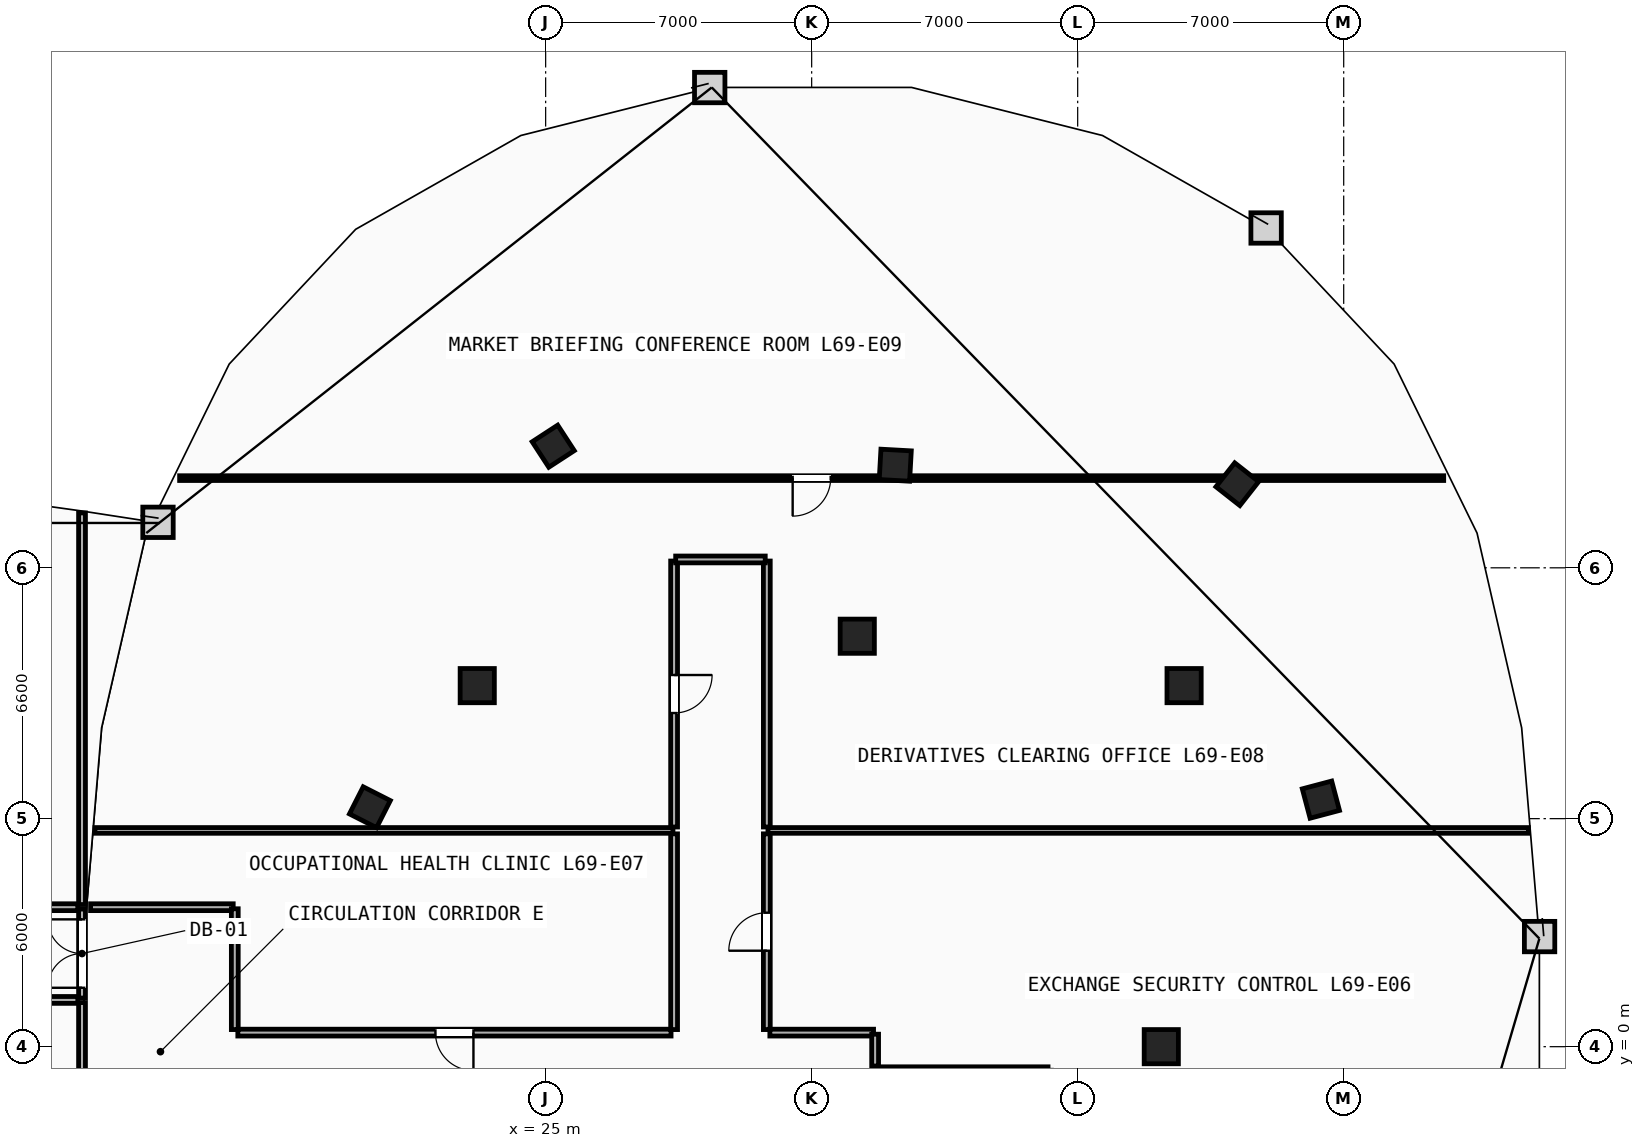
"""IFC4 building model, lengths in metres.
Left out: names, types, materials, properties, quantities, classifications, styles, units other than length and angle.
Written with IfcOpenShell. Run it as: python <this file> out.ifc"""

import sys

from ifc_helpers import new_model, si_unit, direction, frame, frame_2d, origin, origin_2d, place, context, subcontext, project, spatial, rectangle, extrude, element, fill, save


model = new_model("IFC4")
c1 = context("Model", 3, precision=1e-05, world=origin(), true_north=direction((0.0, 1.0)))
c2 = subcontext(c1, "Body", "Model", "MODEL_VIEW")
j1 = project(units=[si_unit("LENGTHUNIT", "METRE"), si_unit("PLANEANGLEUNIT", "RADIAN")], contexts=[c1])
p1 = place(None, origin())
s1 = spatial("IfcSite", under=j1, at=p1, CompositionType="ELEMENT")
p2 = place(p1, origin())
s2 = spatial("IfcBuilding", under=s1, at=p2, CompositionType="ELEMENT")
p3 = place(p2, frame((0.0, 0.0, 261.2)))
s3 = spatial("IfcBuildingStorey", under=s2, at=p3, CompositionType="ELEMENT", Elevation=261.2)
for number, where, z_axis, x_axis in (
    (1, (41.2, 0.0, 0.0), (0.0, 0.0, 1.0), (1.0, 0.0, 0.0)),
    (2, (41.8, 9.5, 0.0), (0.0, 0.0, 1.0), (1.0, 0.0, 0.0)),
    (3, (33.2, 10.8, 0.0), (0.0, 0.0, 1.0), (1.0, 0.0, 0.0)),
    (4, (23.2, 9.5, 0.0), (0.0, 0.0, 1.0), (1.0, 0.0, 0.0)),
):
    element("IfcColumn", number, at=place(p3, frame(where, z_axis=z_axis, x_axis=x_axis)), inside=s3, PredefinedType="COLUMN", context=c2, shape_type="SweptSolid", body=[
        extrude(rectangle(XDim=0.9, YDim=0.9, at=origin_2d()), origin(), (0.0, 0.0, 1.0), 3.6),
    ])
for number, where, z_axis, x_axis in (
    (5, (45.4, 6.5, 0.0), (0.0, 0.0, 1.0), (-0.256, 0.967, 0.0)),
    (6, (43.2, 14.8, 0.0), (0.0, 0.0, 1.0), (-0.786, 0.618, 0.0)),
    (7, (34.2, 15.3, 0.0), (0.0, 0.0, 1.0), (-0.998, 0.055, 0.0)),
    (8, (25.2, 15.8, 0.0), (0.0, 0.0, 1.0), (-0.838, -0.546, 0.0)),
    (9, (20.375, 6.3, 0.0), (0.0, 0.0, 1.0), (-0.453, -0.892, 0.0)),
):
    element("IfcColumn", number, at=place(p3, frame(where, z_axis=z_axis, x_axis=x_axis)), inside=s3, PredefinedType="COLUMN", context=c2, shape_type="SweptSolid", body=[
        extrude(rectangle(XDim=0.8, YDim=0.8, at=origin_2d()), origin(), (0.0, 0.0, 1.0), 3.6),
    ])
p4 = place(p3, frame((33.74, -0.6, 0.0), z_axis=(0.0, 0.0, 1.0), x_axis=(1.0, 0.0, 0.0)))
e10 = element("IfcWall", 10, at=p4, inside=s3, PredefinedType="PARTITIONING", context=c2, shape_type="SweptSolid", body=[
    extrude(rectangle(XDim=4.48, YDim=0.14, at=frame_2d((2.24, 0.0))), origin(), (0.0, 0.0, 1.0), 3.34),
])
p5 = place(p3, frame((13.14, 5.69, 0.0), z_axis=(0.0, 0.0, 1.0), x_axis=(1.0, 0.0, 0.0)))
e11 = element("IfcWall", 11, at=p5, inside=s3, PredefinedType="PARTITIONING", context=c2, shape_type="SweptSolid", body=[
    extrude(rectangle(XDim=15.21, YDim=0.15, at=frame_2d((7.605, 0.0))), origin(), (0.0, 0.0, 1.0), 3.34),
])
p6 = place(p3, frame((30.85, 5.69, 0.0), z_axis=(0.0, 0.0, 1.0), x_axis=(1.0, 0.0, 0.0)))
e12 = element("IfcWall", 12, at=p6, inside=s3, PredefinedType="PARTITIONING", context=c2, shape_type="SweptSolid", body=[
    extrude(rectangle(XDim=20.01, YDim=0.15, at=frame_2d((10.005, 0.0))), origin(), (0.0, 0.0, 1.0), 3.34),
])
p7 = place(p3, frame((30.82, 0.45, 0.0), z_axis=(0.0, 0.0, 1.0), x_axis=(0.0, 1.0, 0.0)))
e13 = element("IfcWall", 13, at=p7, inside=s3, PredefinedType="PARTITIONING", context=c2, shape_type="SweptSolid", body=[
    extrude(rectangle(XDim=5.15, YDim=0.18, at=frame_2d((2.575, 0.0))), origin(), (0.0, 0.0, 1.0), 3.34),
])
p8 = place(p7, frame((2.075, 0.0, 0.0)))
e14 = element("IfcOpeningElement", 14, at=p8, cuts=e13, PredefinedType="OPENING", context=c2, shape_type="SweptSolid", body=[
    extrude(rectangle(XDim=1.0, YDim=2.15, at=frame_2d((0.5, 1.075))), frame((0.0, 0.1, 0.0), z_axis=(0.0, -1.0, 0.0), x_axis=(1.0, 0.0, 0.0)), (0.0, 0.0, 1.0), 0.2),
])
p9 = place(p3, frame((33.628, 0.37, 0.0), z_axis=(0.0, 0.0, 1.0), x_axis=(-1.0, 0.0, 0.0)))
e15 = element("IfcWall", 15, at=p9, inside=s3, PredefinedType="PARTITIONING", context=c2, shape_type="SweptSolid", body=[
    extrude(rectangle(XDim=2.729, YDim=0.18, at=frame_2d((1.364, 0.0))), origin(), (0.0, 0.0, 1.0), 3.34),
])
p10 = place(p3, frame((33.67, -0.509, 0.0), z_axis=(0.0, 0.0, 1.0), x_axis=(0.0, 1.0, 0.0)))
e16 = element("IfcWall", 16, at=p10, inside=s3, PredefinedType="PARTITIONING", context=c2, shape_type="SweptSolid", body=[
    extrude(rectangle(XDim=0.837, YDim=0.18, at=frame_2d((0.418, 0.0))), origin(), (0.0, 0.0, 1.0), 3.34),
])
p11 = place(p3, frame((28.3, 0.37, 0.0), z_axis=(0.0, 0.0, 1.0), x_axis=(-1.0, 0.0, 0.0)))
e17 = element("IfcWall", 17, at=p11, inside=s3, PredefinedType="PARTITIONING", context=c2, shape_type="SweptSolid", body=[
    extrude(rectangle(XDim=11.4, YDim=0.18, at=frame_2d((5.7, 0.0))), origin(), (0.0, 0.0, 1.0), 3.34),
])
p12 = place(p11, frame((5.2, 0.0, 0.0)))
e18 = element("IfcOpeningElement", 18, at=p12, cuts=e17, PredefinedType="OPENING", context=c2, shape_type="SweptSolid", body=[
    extrude(rectangle(XDim=1.0, YDim=2.15, at=frame_2d((0.5, 1.075))), frame((0.0, 0.1, 0.0), z_axis=(0.0, -1.0, 0.0), x_axis=(1.0, 0.0, 0.0)), (0.0, 0.0, 1.0), 0.2),
])
p13 = place(p3, frame((28.38, 5.6, 0.0), z_axis=(0.0, 0.0, 1.0), x_axis=(0.0, -1.0, 0.0)))
e19 = element("IfcWall", 19, at=p13, inside=s3, PredefinedType="PARTITIONING", context=c2, shape_type="SweptSolid", body=[
    extrude(rectangle(XDim=5.15, YDim=0.18, at=frame_2d((2.575, 0.0))), origin(), (0.0, 0.0, 1.0), 3.34),
])
p14 = place(p3, frame((16.779, 3.67, 0.0), z_axis=(0.0, 0.0, 1.0), x_axis=(-1.0, 0.0, 0.0)))
e20 = element("IfcWall", 20, at=p14, inside=s3, PredefinedType="PARTITIONING", context=c2, shape_type="SweptSolid", body=[
    extrude(rectangle(XDim=3.753, YDim=0.18, at=frame_2d((1.876, 0.0))), origin(), (0.0, 0.0, 1.0), 3.34),
])
p15 = place(p3, frame((16.82, 0.45, 0.0), z_axis=(0.0, 0.0, 1.0), x_axis=(0.0, 1.0, 0.0)))
e21 = element("IfcWall", 21, at=p15, inside=s3, PredefinedType="PARTITIONING", context=c2, shape_type="SweptSolid", body=[
    extrude(rectangle(XDim=3.178, YDim=0.18, at=frame_2d((1.589, 0.0))), origin(), (0.0, 0.0, 1.0), 3.34),
])
p16 = place(p3, frame((28.38, 12.779, 0.0), z_axis=(0.0, 0.0, 1.0), x_axis=(0.0, -1.0, 0.0)))
e22 = element("IfcWall", 22, at=p16, inside=s3, PredefinedType="PARTITIONING", context=c2, shape_type="SweptSolid", body=[
    extrude(rectangle(XDim=6.999, YDim=0.18, at=frame_2d((3.499, 0.0))), origin(), (0.0, 0.0, 1.0), 3.34),
])
p17 = place(p16, frame((2.999, 0.0, 0.0)))
e23 = element("IfcOpeningElement", 23, at=p17, cuts=e22, PredefinedType="OPENING", context=c2, shape_type="SweptSolid", body=[
    extrude(rectangle(XDim=1.0, YDim=2.15, at=frame_2d((0.5, 1.075))), frame((0.0, 0.1, 0.0), z_axis=(0.0, -1.0, 0.0), x_axis=(1.0, 0.0, 0.0)), (0.0, 0.0, 1.0), 0.2),
])
p18 = place(p3, frame((30.82, 5.78, 0.0), z_axis=(0.0, 0.0, 1.0), x_axis=(0.0, 1.0, 0.0)))
e24 = element("IfcWall", 24, at=p18, inside=s3, PredefinedType="PARTITIONING", context=c2, shape_type="SweptSolid", body=[
    extrude(rectangle(XDim=6.999, YDim=0.18, at=frame_2d((3.499, 0.0))), origin(), (0.0, 0.0, 1.0), 3.34),
])
p19 = place(p3, frame((30.779, 12.82, 0.0), z_axis=(0.0, 0.0, 1.0), x_axis=(-1.0, 0.0, 0.0)))
e25 = element("IfcWall", 25, at=p19, inside=s3, PredefinedType="PARTITIONING", context=c2, shape_type="SweptSolid", body=[
    extrude(rectangle(XDim=2.357, YDim=0.18, at=frame_2d((1.179, 0.0))), origin(), (0.0, 0.0, 1.0), 3.34),
])
p20 = place(p3, frame((48.632, 14.96, 0.0), z_axis=(0.0, 0.0, 1.0), x_axis=(-1.0, 0.0, 0.0)))
e26 = element("IfcWall", 26, at=p20, inside=s3, PredefinedType="PARTITIONING", context=c2, shape_type="SweptSolid", body=[
    extrude(rectangle(XDim=33.263, YDim=0.125, at=frame_2d((16.632, 0.0))), origin(), (0.0, 0.0, 1.0), 2.724),
])
p21 = place(p20, frame((16.132, 0.0, 0.0)))
e27 = element("IfcOpeningElement", 27, at=p21, cuts=e26, PredefinedType="OPENING", context=c2, shape_type="SweptSolid", body=[
    extrude(rectangle(XDim=1.0, YDim=2.15, at=frame_2d((0.5, 1.075))), frame((0.0, 0.073, 0.0), z_axis=(0.0, -1.0, 0.0), x_axis=(1.0, 0.0, 0.0)), (0.0, 0.0, 1.0), 0.145),
])
p22 = place(p3, frame((-2.105, 1.23, 0.0), z_axis=(0.0, 0.0, 1.0), x_axis=(1.0, 0.0, 0.0)))
e28 = element("IfcWall", 28, at=p22, inside=s3, PredefinedType="PARTITIONING", context=c2, shape_type="SweptSolid", body=[
    extrude(rectangle(XDim=14.793, YDim=0.18, at=frame_2d((7.397, 0.0))), origin(), (0.0, 0.0, 1.0), 3.34),
])
p23 = place(p22, frame((6.597, 0.0, 0.0)))
e29 = element("IfcOpeningElement", 29, at=p23, cuts=e28, PredefinedType="OPENING", context=c2, shape_type="SweptSolid", body=[
    extrude(rectangle(XDim=1.6, YDim=2.2, at=frame_2d((0.8, 1.1))), frame((0.0, 0.1, 0.0), z_axis=(0.0, -1.0, 0.0), x_axis=(1.0, 0.0, 0.0)), (0.0, 0.0, 1.0), 0.2),
])
p24 = place(p3, frame((12.688, 3.67, 0.0), z_axis=(0.0, 0.0, 1.0), x_axis=(-1.0, 0.0, 0.0)))
e30 = element("IfcWall", 30, at=p24, inside=s3, PredefinedType="PARTITIONING", context=c2, shape_type="SweptSolid", body=[
    extrude(rectangle(XDim=14.793, YDim=0.18, at=frame_2d((7.397, 0.0))), origin(), (0.0, 0.0, 1.0), 3.34),
])
p25 = place(p24, frame((6.597, 0.0, 0.0)))
e31 = element("IfcOpeningElement", 31, at=p25, cuts=e30, PredefinedType="OPENING", context=c2, shape_type="SweptSolid", body=[
    extrude(rectangle(XDim=1.6, YDim=2.2, at=frame_2d((0.8, 1.1))), frame((0.0, 0.1, 0.0), z_axis=(0.0, -1.0, 0.0), x_axis=(1.0, 0.0, 0.0)), (0.0, 0.0, 1.0), 0.2),
])
p26 = place(p3, frame((12.8, -14.044, 0.0), z_axis=(0.0, 0.0, 1.0), x_axis=(0.0, 1.0, 0.0)))
e32 = element("IfcWall", 32, at=p26, inside=s3, PredefinedType="PARTITIONING", context=c2, shape_type="SweptSolid", body=[
    extrude(rectangle(XDim=15.204, YDim=0.18, at=frame_2d((7.602, 0.0))), origin(), (0.0, 0.0, 1.0), 3.34),
])
p27 = place(p3, frame((12.8, 3.74, 0.0), z_axis=(0.0, 0.0, 1.0), x_axis=(0.0, 1.0, 0.0)))
e33 = element("IfcWall", 33, at=p27, inside=s3, PredefinedType="PARTITIONING", context=c2, shape_type="SweptSolid", body=[
    extrude(rectangle(XDim=10.304, YDim=0.18, at=frame_2d((5.152, 0.0))), origin(), (0.0, 0.0, 1.0), 3.34),
])
p28 = place(p3, frame((12.8, 1.28, 0.0), z_axis=(0.0, 0.0, 1.0), x_axis=(0.0, 1.0, 0.0)))
e34 = element("IfcWall", 34, at=p28, inside=s3, PredefinedType="PARTITIONING", context=c2, shape_type="SweptSolid", body=[
    extrude(rectangle(XDim=2.34, YDim=0.18, at=frame_2d((1.17, 0.0))), origin(), (0.0, 0.0, 1.0), 3.34),
])
p29 = place(p28, frame((0.27, 0.0, 0.0)))
e35 = element("IfcOpeningElement", 35, at=p29, cuts=e34, PredefinedType="OPENING", context=c2, shape_type="SweptSolid", body=[
    extrude(rectangle(XDim=1.8, YDim=2.25, at=frame_2d((0.9, 1.125))), frame((0.0, 0.1, 0.0), z_axis=(0.0, -1.0, 0.0), x_axis=(1.0, 0.0, 0.0)), (0.0, 0.0, 1.0), 0.2),
])
p30 = place(p21, origin())
e36 = element("IfcDoor", 36, at=p30, inside=s3, OperationType="SINGLE_SWING_RIGHT", PredefinedType="DOOR", context=c2, shape_type="SweptSolid", body=[
    extrude(rectangle(XDim=1.0, YDim=2.15, at=frame_2d((0.5, 1.075))), frame((0.0, 0.025, 0.0), z_axis=(0.0, -1.0, 0.0), x_axis=(1.0, 0.0, 0.0)), (0.0, 0.0, 1.0), 0.05),
])
fill(e27, e36)
p31 = place(p12, origin())
e37 = element("IfcDoor", 37, at=p31, inside=s3, OperationType="SINGLE_SWING_LEFT", PredefinedType="DOOR", context=c2, shape_type="SweptSolid", body=[
    extrude(rectangle(XDim=1.0, YDim=2.15, at=frame_2d((0.5, 1.075))), frame((0.0, 0.025, 0.0), z_axis=(0.0, -1.0, 0.0), x_axis=(1.0, 0.0, 0.0)), (0.0, 0.0, 1.0), 0.05),
])
fill(e18, e37)
p32 = place(p17, origin())
e38 = element("IfcDoor", 38, at=p32, inside=s3, OperationType="SINGLE_SWING_LEFT", PredefinedType="DOOR", context=c2, shape_type="SweptSolid", body=[
    extrude(rectangle(XDim=1.0, YDim=2.15, at=frame_2d((0.5, 1.075))), frame((0.0, 0.025, 0.0), z_axis=(0.0, -1.0, 0.0), x_axis=(1.0, 0.0, 0.0)), (0.0, 0.0, 1.0), 0.05),
])
fill(e23, e38)
p33 = place(p8, origin())
e39 = element("IfcDoor", 39, at=p33, inside=s3, OperationType="SINGLE_SWING_LEFT", PredefinedType="DOOR", context=c2, shape_type="SweptSolid", body=[
    extrude(rectangle(XDim=1.0, YDim=2.15, at=frame_2d((0.5, 1.075))), frame((0.0, 0.025, 0.0), z_axis=(0.0, -1.0, 0.0), x_axis=(1.0, 0.0, 0.0)), (0.0, 0.0, 1.0), 0.05),
])
fill(e14, e39)
p34 = place(p29, origin())
e40 = element("IfcDoor", 40, at=p34, inside=s3, OperationType="DOUBLE_DOOR_SINGLE_SWING", PredefinedType="DOOR", context=c2, shape_type="SweptSolid", body=[
    extrude(rectangle(XDim=1.8, YDim=2.25, at=frame_2d((0.9, 1.125))), frame((0.0, 0.025, 0.0), z_axis=(0.0, -1.0, 0.0), x_axis=(1.0, 0.0, 0.0)), (0.0, 0.0, 1.0), 0.05),
])
fill(e35, e40)
save(model, sys.argv[1])
